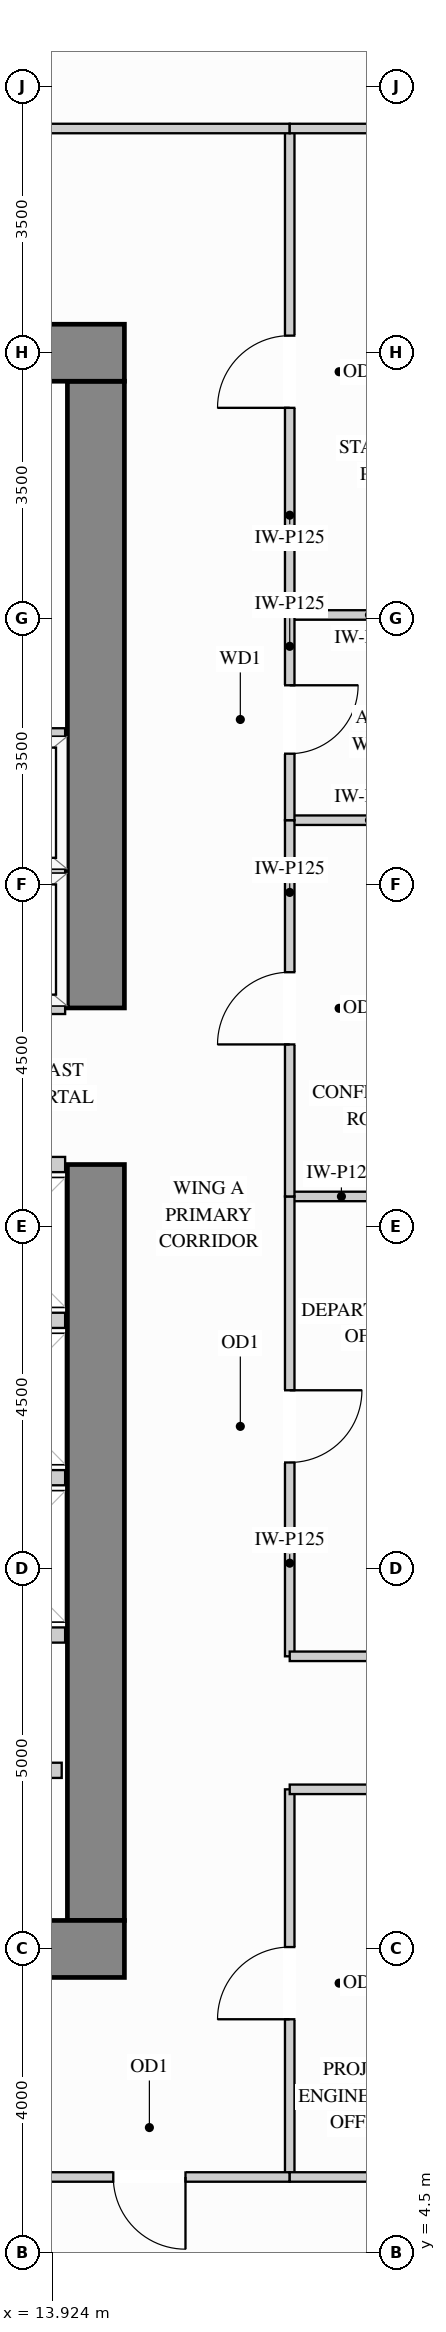
"""IFC4 building model, lengths in metres.
Left out: names, types, materials, properties, quantities, classifications, styles, units other than length and angle.
Written with IfcOpenShell. Run it as: python <this file> out.ifc"""

import sys

from ifc_helpers import new_model, si_unit, direction, frame, frame_2d, origin, place, context, subcontext, project, spatial, rectangle, extrude, source, transform, mapped, element, fill, save


model = new_model("IFC4")
c1 = context("Model", 3, precision=1e-05, world=origin(), true_north=direction((0.0, 1.0)))
c2 = subcontext(c1, "Body", "Model", "MODEL_VIEW")
j1 = project(units=[si_unit("LENGTHUNIT", "METRE"), si_unit("PLANEANGLEUNIT", "RADIAN")], contexts=[c1])
p1 = place(None, origin())
s1 = spatial("IfcSite", under=j1, at=p1, CompositionType="ELEMENT")
p2 = place(p1, origin())
s2 = spatial("IfcBuilding", under=s1, at=p2, CompositionType="ELEMENT")
p3 = place(p2, frame((0.0, 0.0, 131.4)))
s3 = spatial("IfcBuildingStorey", under=s2, at=p3, CompositionType="ELEMENT", Elevation=131.4)
m1 = source(origin(), c2, "Body", "SweptSolid", [
    extrude(rectangle(XDim=9.945, YDim=0.75, at=frame_2d((4.973, 0.0))), origin(), (0.0, 0.0, 1.0), 3.38),
])
p4 = place(p3, frame((14.5, 8.875, 0.0), z_axis=(0.0, 0.0, 1.0), x_axis=(0.0, 1.0, 0.0)))
e1 = element("IfcWall", 1, at=p4, inside=s3, PredefinedType="SHEAR", context=c2, shape_type="MappedRepresentation", body=[
    mapped(m1, transform((0.0, 0.0, 0.0), x_axis=(1.0, 0.0, 0.0), y_axis=(0.0, 1.0, 0.0), z_axis=(0.0, 0.0, 1.0))),
])
m2 = source(origin(), c2, "Body", "SweptSolid", [
    extrude(rectangle(XDim=8.245, YDim=0.75, at=frame_2d((4.123, 0.0))), origin(), (0.0, 0.0, 1.0), 3.38),
])
p5 = place(p3, frame((14.5, 20.88, 0.0), z_axis=(0.0, 0.0, 1.0), x_axis=(0.0, 1.0, 0.0)))
e2 = element("IfcWall", 2, at=p5, inside=s3, PredefinedType="SHEAR", context=c2, shape_type="MappedRepresentation", body=[
    mapped(m2, transform((0.0, 0.0, 0.0), x_axis=(1.0, 0.0, 0.0), y_axis=(0.0, 1.0, 0.0), z_axis=(0.0, 0.0, 1.0))),
])
m3 = source(origin(), c2, "Body", "SweptSolid", [
    extrude(rectangle(XDim=10.75, YDim=0.75, at=frame_2d((5.375, 0.0))), origin(), (0.0, 0.0, 1.0), 3.38),
])
for number, where, z_axis, x_axis in (
    (3, (4.125, 29.5, 0.0), (0.0, 0.0, 1.0), (1.0, 0.0, 0.0)),
    (4, (4.125, 8.5, 0.0), (0.0, 0.0, 1.0), (1.0, 0.0, 0.0)),
):
    element("IfcWall", number, at=place(p3, frame(where, z_axis=z_axis, x_axis=x_axis)), inside=s3, PredefinedType="SHEAR", context=c2, shape_type="MappedRepresentation", body=[
        mapped(m3, transform((0.0, 0.0, 0.0), x_axis=(1.0, 0.0, 0.0), y_axis=(0.0, 1.0, 0.0), z_axis=(0.0, 0.0, 1.0))),
    ])
m4 = source(origin(), c2, "Body", "SweptSolid", [
    extrude(rectangle(XDim=1.36, YDim=0.125, at=frame_2d((0.68, 0.0))), origin(), (0.0, 0.0, 1.0), 3.365),
])
p6 = place(p3, frame((17.05, 18.4, 0.0), z_axis=(0.0, 0.0, 1.0), x_axis=(1.0, 0.0, 0.0)))
e5 = element("IfcWall", 5, at=p6, inside=s3, PredefinedType="PARTITIONING", context=c2, shape_type="MappedRepresentation", body=[
    mapped(m4, transform((0.0, 0.0, 0.0), x_axis=(1.0, 0.0, 0.0), y_axis=(0.0, 1.0, 0.0), z_axis=(0.0, 0.0, 1.0))),
])
m5 = source(origin(), c2, "Body", "SweptSolid", [
    extrude(rectangle(XDim=2.098, YDim=0.125, at=frame_2d((1.049, 0.0))), origin(), (0.0, 0.0, 1.0), 3.365),
])
for number, where, z_axis, x_axis in (
    (6, (17.05, 23.35, 0.0), (0.0, 0.0, 1.0), (1.0, 0.0, 0.0)),
    (7, (17.05, 26.05, 0.0), (0.0, 0.0, 1.0), (1.0, 0.0, 0.0)),
):
    element("IfcWall", number, at=place(p3, frame(where, z_axis=z_axis, x_axis=x_axis)), inside=s3, PredefinedType="PARTITIONING", context=c2, shape_type="MappedRepresentation", body=[
        mapped(m5, transform((0.0, 0.0, 0.0), x_axis=(1.0, 0.0, 0.0), y_axis=(0.0, 1.0, 0.0), z_axis=(0.0, 0.0, 1.0))),
    ])
p7 = place(p3, frame((17.05, 12.35, 0.0), z_axis=(0.0, 0.0, 1.0), x_axis=(0.0, 1.0, 0.0)))
e8 = element("IfcWall", 8, at=p7, inside=s3, PredefinedType="PARTITIONING", context=c2, shape_type="SweptSolid", body=[
    extrude(rectangle(XDim=6.05, YDim=0.125, at=frame_2d((3.025, 0.0))), origin(), (0.0, 0.0, 1.0), 3.365),
])
p8 = place(p7, frame((2.55, 0.0, 0.0)))
e9 = element("IfcOpeningElement", 9, at=p8, cuts=e8, PredefinedType="OPENING", context=c2, shape_type="SweptSolid", body=[
    extrude(rectangle(XDim=0.95, YDim=2.15, at=frame_2d((0.475, 1.075))), frame((0.0, 0.073, 0.0), z_axis=(0.0, -1.0, 0.0), x_axis=(1.0, 0.0, 0.0)), (0.0, 0.0, 1.0), 0.145),
])
p9 = place(p3, frame((17.05, 18.4, 0.0), z_axis=(0.0, 0.0, 1.0), x_axis=(0.0, 1.0, 0.0)))
e10 = element("IfcWall", 10, at=p9, inside=s3, PredefinedType="PARTITIONING", context=c2, shape_type="SweptSolid", body=[
    extrude(rectangle(XDim=4.95, YDim=0.125, at=frame_2d((2.475, 0.0))), origin(), (0.0, 0.0, 1.0), 3.365),
])
p10 = place(p9, frame((2.0, 0.0, 0.0)))
e11 = element("IfcOpeningElement", 11, at=p10, cuts=e10, PredefinedType="OPENING", context=c2, shape_type="SweptSolid", body=[
    extrude(rectangle(XDim=0.95, YDim=2.15, at=frame_2d((0.475, 1.075))), frame((0.0, 0.073, 0.0), z_axis=(0.0, -1.0, 0.0), x_axis=(1.0, 0.0, 0.0)), (0.0, 0.0, 1.0), 0.145),
])
p11 = place(p3, frame((17.05, 26.05, 0.0), z_axis=(0.0, 0.0, 1.0), x_axis=(0.0, 1.0, 0.0)))
e12 = element("IfcWall", 12, at=p11, inside=s3, PredefinedType="PARTITIONING", context=c2, shape_type="SweptSolid", body=[
    extrude(rectangle(XDim=6.4, YDim=0.125, at=frame_2d((3.2, 0.0))), origin(), (0.0, 0.0, 1.0), 3.365),
])
p12 = place(p11, frame((2.725, 0.0, 0.0)))
e13 = element("IfcOpeningElement", 13, at=p12, cuts=e12, PredefinedType="OPENING", context=c2, shape_type="SweptSolid", body=[
    extrude(rectangle(XDim=0.95, YDim=2.15, at=frame_2d((0.475, 1.075))), frame((0.0, 0.073, 0.0), z_axis=(0.0, -1.0, 0.0), x_axis=(1.0, 0.0, 0.0)), (0.0, 0.0, 1.0), 0.145),
])
p13 = place(p3, frame((17.05, 5.5, 0.0), z_axis=(0.0, 0.0, 1.0), x_axis=(0.0, 1.0, 0.0)))
e14 = element("IfcWall", 14, at=p13, inside=s3, PredefinedType="PARTITIONING", context=c2, shape_type="SweptSolid", body=[
    extrude(rectangle(XDim=5.1, YDim=0.125, at=frame_2d((2.55, 0.0))), origin(), (0.0, 0.0, 1.0), 3.365),
])
p14 = place(p13, frame((2.075, 0.0, 0.0)))
e15 = element("IfcOpeningElement", 15, at=p14, cuts=e14, PredefinedType="OPENING", context=c2, shape_type="SweptSolid", body=[
    extrude(rectangle(XDim=0.95, YDim=2.15, at=frame_2d((0.475, 1.075))), frame((0.0, 0.073, 0.0), z_axis=(0.0, -1.0, 0.0), x_axis=(1.0, 0.0, 0.0)), (0.0, 0.0, 1.0), 0.145),
])
p15 = place(p3, frame((17.05, 23.35, 0.0), z_axis=(0.0, 0.0, 1.0), x_axis=(0.0, 1.0, 0.0)))
e16 = element("IfcWall", 16, at=p15, inside=s3, PredefinedType="PARTITIONING", context=c2, shape_type="SweptSolid", body=[
    extrude(rectangle(XDim=2.7, YDim=0.125, at=frame_2d((1.35, 0.0))), origin(), (0.0, 0.0, 1.0), 3.365),
])
p16 = place(p15, frame((0.875, 0.0, 0.0)))
e17 = element("IfcOpeningElement", 17, at=p16, cuts=e16, PredefinedType="OPENING", context=c2, shape_type="SweptSolid", body=[
    extrude(rectangle(XDim=0.9, YDim=2.15, at=frame_2d((0.45, 1.075))), frame((0.0, 0.073, 0.0), z_axis=(0.0, -1.0, 0.0), x_axis=(1.0, 0.0, 0.0)), (0.0, 0.0, 1.0), 0.145),
])
p17 = place(p3, frame((9.039, 32.45, 0.0), z_axis=(0.0, 0.0, 1.0), x_axis=(1.0, 0.0, 0.0)))
e18 = element("IfcWall", 18, at=p17, inside=s3, PredefinedType="PARTITIONING", context=c2, shape_type="SweptSolid", body=[
    extrude(rectangle(XDim=8.011, YDim=0.125, at=frame_2d((4.005, 0.0))), origin(), (0.0, 0.0, 1.0), 3.365),
])
p18 = place(p17, frame((3.531, 0.0, 0.0)))
e19 = element("IfcOpeningElement", 19, at=p18, cuts=e18, PredefinedType="OPENING", context=c2, shape_type="SweptSolid", body=[
    extrude(rectangle(XDim=0.95, YDim=2.15, at=frame_2d((0.475, 1.075))), frame((0.0, 0.073, 0.0), z_axis=(0.0, -1.0, 0.0), x_axis=(1.0, 0.0, 0.0)), (0.0, 0.0, 1.0), 0.145),
])
p19 = place(p3, frame((17.05, 32.45, 0.0), z_axis=(0.0, 0.0, 1.0), x_axis=(1.0, 0.0, 0.0)))
e20 = element("IfcWall", 20, at=p19, inside=s3, PredefinedType="PARTITIONING", context=c2, shape_type="MappedRepresentation", body=[
    mapped(m5, transform((0.0, 0.0, 0.0), x_axis=(1.0, 0.0, 0.0), y_axis=(0.0, 1.0, 0.0), z_axis=(0.0, 0.0, 1.0))),
])
m6 = source(origin(), c2, "Body", "SweptSolid", [
    extrude(rectangle(XDim=2.45, YDim=0.125, at=frame_2d((1.225, 0.0))), origin(), (0.0, 0.0, 1.0), 3.365),
])
for number, where, z_axis, x_axis in (
    (21, (17.05, 12.35, 0.0), (0.0, 0.0, 1.0), (1.0, 0.0, 0.0)),
    (22, (17.05, 10.6, 0.0), (0.0, 0.0, 1.0), (1.0, 0.0, 0.0)),
):
    element("IfcWall", number, at=place(p3, frame(where, z_axis=z_axis, x_axis=x_axis)), inside=s3, PredefinedType="PARTITIONING", context=c2, shape_type="MappedRepresentation", body=[
        mapped(m6, transform((0.0, 0.0, 0.0), x_axis=(1.0, 0.0, 0.0), y_axis=(0.0, 1.0, 0.0), z_axis=(0.0, 0.0, 1.0))),
    ])
p20 = place(p3, frame((13.357, 5.5, 0.0), z_axis=(0.0, 0.0, 1.0), x_axis=(1.0, 0.0, 0.0)))
e23 = element("IfcWall", 23, at=p20, inside=s3, PredefinedType="PARTITIONING", context=c2, shape_type="SweptSolid", body=[
    extrude(rectangle(XDim=3.693, YDim=0.125, at=frame_2d((1.847, 0.0))), origin(), (0.0, 0.0, 1.0), 3.365),
])
p21 = place(p20, frame((1.372, 0.0, 0.0)))
e24 = element("IfcOpeningElement", 24, at=p21, cuts=e23, PredefinedType="OPENING", context=c2, shape_type="SweptSolid", body=[
    extrude(rectangle(XDim=0.95, YDim=2.15, at=frame_2d((0.475, 1.075))), frame((0.0, 0.073, 0.0), z_axis=(0.0, -1.0, 0.0), x_axis=(1.0, 0.0, 0.0)), (0.0, 0.0, 1.0), 0.145),
])
p22 = place(p3, frame((17.05, 5.5, 0.0), z_axis=(0.0, 0.0, 1.0), x_axis=(1.0, 0.0, 0.0)))
e25 = element("IfcWall", 25, at=p22, inside=s3, PredefinedType="PARTITIONING", context=c2, shape_type="MappedRepresentation", body=[
    mapped(m5, transform((0.0, 0.0, 0.0), x_axis=(1.0, 0.0, 0.0), y_axis=(0.0, 1.0, 0.0), z_axis=(0.0, 0.0, 1.0))),
])
m7 = source(origin(), c2, "Body", "SweptSolid", [
    extrude(rectangle(XDim=1.63, YDim=0.2, at=frame_2d((0.815, 0.0))), origin(), (0.0, 0.0, 1.0), 3.365),
])
p23 = place(p3, frame((12.42, 10.85, 0.0), z_axis=(0.0, 0.0, 1.0), x_axis=(1.0, 0.0, 0.0)))
e26 = element("IfcWall", 26, at=p23, inside=s3, PredefinedType="PARTITIONING", context=c2, shape_type="MappedRepresentation", body=[
    mapped(m7, transform((0.0, 0.0, 0.0), x_axis=(1.0, 0.0, 0.0), y_axis=(0.0, 1.0, 0.0), z_axis=(0.0, 0.0, 1.0))),
])
m8 = source(origin(), c2, "Body", "SweptSolid", [
    extrude(rectangle(XDim=2.265, YDim=0.2, at=frame_2d((1.132, 0.0))), origin(), (0.0, 0.0, 1.0), 3.365),
])
for number, where, z_axis, x_axis in (
    (27, (11.83, 22.66, 0.0), (0.0, 0.0, 1.0), (1.0, 0.0, 0.0)),
    (28, (11.83, 20.9, 0.0), (0.0, 0.0, 1.0), (1.0, 0.0, 0.0)),
    (29, (11.83, 24.46, 0.0), (0.0, 0.0, 1.0), (1.0, 0.0, 0.0)),
):
    element("IfcWall", number, at=place(p3, frame(where, z_axis=z_axis, x_axis=x_axis)), inside=s3, PredefinedType="PARTITIONING", context=c2, shape_type="MappedRepresentation", body=[
        mapped(m8, transform((0.0, 0.0, 0.0), x_axis=(1.0, 0.0, 0.0), y_axis=(0.0, 1.0, 0.0), z_axis=(0.0, 0.0, 1.0))),
    ])
m9 = source(origin(), c2, "Body", "SweptSolid", [
    extrude(rectangle(XDim=1.865, YDim=0.2, at=frame_2d((0.933, 0.0))), origin(), (0.0, 0.0, 1.0), 3.365),
])
for number, where, z_axis, x_axis in (
    (30, (12.23, 14.7, 0.0), (0.0, 0.0, 1.0), (1.0, 0.0, 0.0)),
    (31, (12.23, 12.63, 0.0), (0.0, 0.0, 1.0), (1.0, 0.0, 0.0)),
    (32, (12.23, 16.77, 0.0), (0.0, 0.0, 1.0), (1.0, 0.0, 0.0)),
    (33, (12.23, 18.82, 0.0), (0.0, 0.0, 1.0), (1.0, 0.0, 0.0)),
):
    element("IfcWall", number, at=place(p3, frame(where, z_axis=z_axis, x_axis=x_axis)), inside=s3, PredefinedType="PARTITIONING", context=c2, shape_type="MappedRepresentation", body=[
        mapped(m9, transform((0.0, 0.0, 0.0), x_axis=(1.0, 0.0, 0.0), y_axis=(0.0, 1.0, 0.0), z_axis=(0.0, 0.0, 1.0))),
    ])
m10 = source(origin(), c2, "Body", "SweptSolid", [
    extrude(rectangle(XDim=0.95, YDim=2.15, at=frame_2d((0.475, 1.075))), frame((0.0, 0.025, 0.0), z_axis=(0.0, -1.0, 0.0), x_axis=(1.0, 0.0, 0.0)), (0.0, 0.0, 1.0), 0.05),
])
p24 = place(p14, origin())
e34 = element("IfcDoor", 34, at=p24, inside=s3, OperationType="SINGLE_SWING_LEFT", PredefinedType="DOOR", context=c2, shape_type="MappedRepresentation", body=[
    mapped(m10, transform((0.0, 0.0, 0.0), x_axis=(1.0, 0.0, 0.0), y_axis=(0.0, 1.0, 0.0), z_axis=(0.0, 0.0, 1.0))),
])
fill(e15, e34)
p25 = place(p8, origin())
e35 = element("IfcDoor", 35, at=p25, inside=s3, OperationType="SINGLE_SWING_RIGHT", PredefinedType="DOOR", context=c2, shape_type="MappedRepresentation", body=[
    mapped(m10, transform((0.0, 0.0, 0.0), x_axis=(1.0, 0.0, 0.0), y_axis=(0.0, 1.0, 0.0), z_axis=(0.0, 0.0, 1.0))),
])
fill(e9, e35)
p26 = place(p10, origin())
e36 = element("IfcDoor", 36, at=p26, inside=s3, OperationType="SINGLE_SWING_LEFT", PredefinedType="DOOR", context=c2, shape_type="MappedRepresentation", body=[
    mapped(m10, transform((0.0, 0.0, 0.0), x_axis=(1.0, 0.0, 0.0), y_axis=(0.0, 1.0, 0.0), z_axis=(0.0, 0.0, 1.0))),
])
fill(e11, e36)
p27 = place(p12, origin())
e37 = element("IfcDoor", 37, at=p27, inside=s3, OperationType="SINGLE_SWING_LEFT", PredefinedType="DOOR", context=c2, shape_type="MappedRepresentation", body=[
    mapped(m10, transform((0.0, 0.0, 0.0), x_axis=(1.0, 0.0, 0.0), y_axis=(0.0, 1.0, 0.0), z_axis=(0.0, 0.0, 1.0))),
])
fill(e13, e37)
p28 = place(p21, origin())
e38 = element("IfcDoor", 38, at=p28, inside=s3, OperationType="SINGLE_SWING_RIGHT", PredefinedType="DOOR", context=c2, shape_type="MappedRepresentation", body=[
    mapped(m10, transform((0.0, 0.0, 0.0), x_axis=(1.0, 0.0, 0.0), y_axis=(0.0, 1.0, 0.0), z_axis=(0.0, 0.0, 1.0))),
])
fill(e24, e38)
m11 = source(origin(), c2, "Body", "SweptSolid", [
    extrude(rectangle(XDim=0.9, YDim=2.15, at=frame_2d((0.45, 1.075))), frame((0.0, 0.025, 0.0), z_axis=(0.0, -1.0, 0.0), x_axis=(1.0, 0.0, 0.0)), (0.0, 0.0, 1.0), 0.05),
])
p29 = place(p16, origin())
e39 = element("IfcDoor", 39, at=p29, inside=s3, OperationType="SINGLE_SWING_RIGHT", PredefinedType="DOOR", context=c2, shape_type="MappedRepresentation", body=[
    mapped(m11, transform((0.0, 0.0, 0.0), x_axis=(1.0, 0.0, 0.0), y_axis=(0.0, 1.0, 0.0), z_axis=(0.0, 0.0, 1.0))),
])
fill(e17, e39)
save(model, sys.argv[1])
